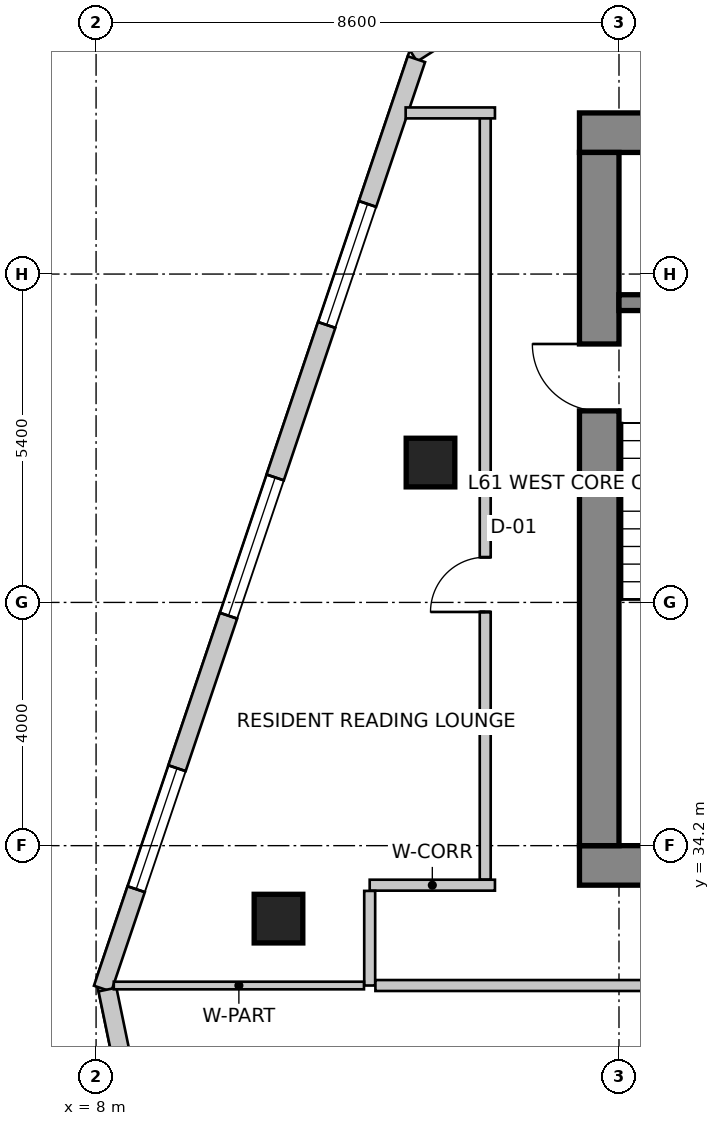
"""IFC4 building model, lengths in metres.
Left out: names, types, materials, properties, quantities, classifications, styles, units other than length and angle.
Written with IfcOpenShell. Run it as: python <this file> out.ifc"""

import sys

from ifc_helpers import new_model, si_unit, direction, frame, frame_2d, origin, origin_2d, place, context, subcontext, project, spatial, rectangle, extrude, source, transform, mapped, element, fill, save


model = new_model("IFC4")
c1 = context("Model", 3, precision=1e-05, world=origin(), true_north=direction((0.0, 1.0)))
c2 = subcontext(c1, "Body", "Model", "MODEL_VIEW")
j1 = project(units=[si_unit("LENGTHUNIT", "METRE"), si_unit("PLANEANGLEUNIT", "RADIAN")], contexts=[c1])
p1 = place(None, origin())
s1 = spatial("IfcSite", under=j1, at=p1, CompositionType="ELEMENT")
p2 = place(p1, origin())
s2 = spatial("IfcBuilding", under=s1, at=p2, CompositionType="ELEMENT")
p3 = place(p2, frame((0.0, 0.0, 239.4)))
s3 = spatial("IfcBuildingStorey", under=s2, at=p3, CompositionType="ELEMENT", Elevation=239.4)
p4 = place(p3, frame((15.95, 45.925, 0.0), z_axis=(0.0, 0.0, 1.0), x_axis=(1.0, 0.0, 0.0)))
e1 = element("IfcWall", 1, at=p4, inside=s3, PredefinedType="SHEAR", context=c2, shape_type="SweptSolid", body=[
    extrude(rectangle(XDim=15.7, YDim=0.65, at=frame_2d((7.85, 0.0))), origin(), (0.0, 0.0, 1.0), 3.5),
])
p5 = place(p3, frame((15.95, 33.875, 0.0), z_axis=(0.0, 0.0, 1.0), x_axis=(1.0, 0.0, 0.0)))
e2 = element("IfcWall", 2, at=p5, inside=s3, PredefinedType="SHEAR", context=c2, shape_type="SweptSolid", body=[
    extrude(rectangle(XDim=15.7, YDim=0.65, at=frame_2d((7.85, 0.0))), origin(), (0.0, 0.0, 1.0), 3.5),
])
m1 = source(origin(), c2, "Body", "SweptSolid", [
    extrude(rectangle(XDim=1.1, YDim=2.15, at=frame_2d((0.55, 1.075))), frame((0.0, 0.335, 0.0), z_axis=(0.0, -1.0, 0.0), x_axis=(1.0, 0.0, 0.0)), (0.0, 0.0, 1.0), 0.67),
])
p6 = place(p5, frame((10.08, 0.0, 0.0)))
e3 = element("IfcOpeningElement", 3, at=p6, cuts=e2, PredefinedType="OPENING", context=c2, shape_type="MappedRepresentation", body=[
    mapped(m1, transform((0.0, 0.0, 0.0), scale=1.0)),
])
p7 = place(p3, frame((16.275, 34.2, 0.0), z_axis=(0.0, 0.0, 1.0), x_axis=(0.0, 1.0, 0.0)))
e4 = element("IfcWall", 4, at=p7, inside=s3, PredefinedType="SHEAR", context=c2, shape_type="SweptSolid", body=[
    extrude(rectangle(XDim=11.4, YDim=0.65, at=frame_2d((5.7, 0.0))), origin(), (0.0, 0.0, 1.0), 3.5),
])
p8 = place(p7, frame((7.15, 0.0, 0.0)))
e5 = element("IfcOpeningElement", 5, at=p8, cuts=e4, PredefinedType="OPENING", context=c2, shape_type="MappedRepresentation", body=[
    mapped(m1, transform((0.0, 0.0, 0.0), scale=1.0)),
])
p9 = place(p3, frame((16.6, 43.13, 0.0), z_axis=(0.0, 0.0, 1.0), x_axis=(1.0, 0.0, 0.0)))
e6 = element("IfcWall", 6, at=p9, inside=s3, PredefinedType="SHEAR", context=c2, shape_type="SweptSolid", body=[
    extrude(rectangle(XDim=3.5, YDim=0.26, at=frame_2d((1.75, 0.0))), origin(), (0.0, 0.0, 1.0), 3.5),
])
m2 = source(origin(), c2, "Body", "SweptSolid", [
    extrude(rectangle(XDim=0.8, YDim=0.8, at=origin_2d()), origin(), (0.0, 0.0, 1.0), 3.5),
])
for number, where, z_axis, x_axis in (
    (7, (11.0, 33.0, 0.0), (0.0, 0.0, 1.0), (1.0, 0.0, 0.0)),
    (8, (13.5, 40.5, 0.0), (0.0, 0.0, 1.0), (1.0, 0.0, 0.0)),
):
    element("IfcColumn", number, at=place(p3, frame(where, z_axis=z_axis, x_axis=x_axis)), inside=s3, PredefinedType="COLUMN", context=c2, shape_type="MappedRepresentation", body=[
        mapped(m2, transform((0.0, 0.0, 0.0), scale=1.0)),
    ])
p10 = place(p3, frame((21.874, 52.742, 0.0), z_axis=(0.0, 0.0, 1.0), x_axis=(-0.84365659959, -0.536883173482, 0.0)))
e9 = element("IfcWall", 9, at=p10, inside=s3, PredefinedType="SOLIDWALL", context=c2, shape_type="SweptSolid", body=[
    extrude(rectangle(XDim=10.283, YDim=0.3, at=frame_2d((5.142, 0.0))), origin(), (0.0, 0.0, 1.0), 3.2),
])
m3 = source(origin(), c2, "Body", "SweptSolid", [
    extrude(rectangle(XDim=2.4, YDim=2.2, at=frame_2d((1.2, 1.1))), frame((0.0, 0.16, 0.0), z_axis=(0.0, -1.0, 0.0), x_axis=(1.0, 0.0, 0.0)), (0.0, 0.0, 1.0), 0.32),
])
p11 = place(p10, frame((3.307, 0.0, 0.85)))
e10 = element("IfcOpeningElement", 10, at=p11, cuts=e9, PredefinedType="OPENING", context=c2, shape_type="MappedRepresentation", body=[
    mapped(m3, transform((0.0, 0.0, 0.0), scale=1.0)),
])
p12 = place(p3, frame((13.269, 47.134, 0.0), z_axis=(0.0, 0.0, 1.0), x_axis=(-0.319920776449, -0.947444297464, 0.0)))
e11 = element("IfcWall", 11, at=p12, inside=s3, PredefinedType="SOLIDWALL", context=c2, shape_type="SweptSolid", body=[
    extrude(rectangle(XDim=16.133, YDim=0.3, at=frame_2d((8.067, 0.0))), origin(), (0.0, 0.0, 1.0), 3.2),
])
m4 = source(origin(), c2, "Body", "SweptSolid", [
    extrude(rectangle(XDim=2.1, YDim=2.0, at=frame_2d((1.05, 1.0))), frame((0.0, 0.16, 0.0), z_axis=(0.0, -1.0, 0.0), x_axis=(1.0, 0.0, 0.0)), (0.0, 0.0, 1.0), 0.32),
])
p13 = place(p12, frame((2.513, 0.0, 0.85)))
e12 = element("IfcOpeningElement", 12, at=p13, cuts=e11, PredefinedType="OPENING", context=c2, shape_type="MappedRepresentation", body=[
    mapped(m4, transform((0.0, 0.0, 0.0), scale=1.0)),
])
p14 = place(p12, frame((7.26, 0.0, 0.85)))
e13 = element("IfcOpeningElement", 13, at=p14, cuts=e11, PredefinedType="OPENING", context=c2, shape_type="MappedRepresentation", body=[
    mapped(m3, transform((0.0, 0.0, 0.0), scale=1.0)),
])
p15 = place(p12, frame((12.307, 0.0, 0.85)))
e14 = element("IfcOpeningElement", 14, at=p15, cuts=e11, PredefinedType="OPENING", context=c2, shape_type="MappedRepresentation", body=[
    mapped(m4, transform((0.0, 0.0, 0.0), scale=1.0)),
])
p16 = place(p3, frame((8.188, 31.834, 0.0), z_axis=(0.0, 0.0, 1.0), x_axis=(0.202303475707, -0.979322880217, 0.0)))
e15 = element("IfcWall", 15, at=p16, inside=s3, PredefinedType="SOLIDWALL", context=c2, shape_type="SweptSolid", body=[
    extrude(rectangle(XDim=15.766, YDim=0.3, at=frame_2d((7.883, 0.0))), origin(), (0.0, 0.0, 1.0), 3.2),
])
p17 = place(p16, frame((2.14, 0.0, 0.85)))
e16 = element("IfcOpeningElement", 16, at=p17, cuts=e15, PredefinedType="OPENING", context=c2, shape_type="MappedRepresentation", body=[
    mapped(m3, transform((0.0, 0.0, 0.0), scale=1.0)),
])
p18 = place(p16, frame((8.329, 0.0, 0.85)))
e17 = element("IfcOpeningElement", 17, at=p18, cuts=e15, PredefinedType="OPENING", context=c2, shape_type="MappedRepresentation", body=[
    mapped(m4, transform((0.0, 0.0, 0.0), scale=1.0)),
])
p19 = place(p16, frame((12.942, 0.0, 0.85)))
e18 = element("IfcOpeningElement", 18, at=p19, cuts=e15, PredefinedType="OPENING", context=c2, shape_type="MappedRepresentation", body=[
    mapped(m3, transform((0.0, 0.0, 0.0), scale=1.0)),
])
p20 = place(p3, frame((12.5, 33.55, 0.0), z_axis=(0.0, 0.0, 1.0), x_axis=(1.0, 0.0, 0.0)))
e19 = element("IfcWall", 19, at=p20, inside=s3, PredefinedType="PARTITIONING", context=c2, shape_type="SweptSolid", body=[
    extrude(rectangle(XDim=2.06, YDim=0.18, at=frame_2d((1.03, 0.0))), origin(), (0.0, 0.0, 1.0), 3.2),
])
p21 = place(p3, frame((12.5, 31.9, 0.0), z_axis=(0.0, 0.0, 1.0), x_axis=(0.0, 1.0, 0.0)))
e20 = element("IfcWall", 20, at=p21, inside=s3, PredefinedType="PARTITIONING", context=c2, shape_type="SweptSolid", body=[
    extrude(rectangle(XDim=1.556, YDim=0.18, at=frame_2d((0.778, 0.0))), origin(), (0.0, 0.0, 1.0), 2.869),
])
p22 = place(p3, frame((17.96, 31.9, 0.0), z_axis=(0.0, 0.0, 1.0), x_axis=(-1.0, 0.0, 0.0)))
e21 = element("IfcWall", 21, at=p22, inside=s3, PredefinedType="PARTITIONING", context=c2, shape_type="SweptSolid", body=[
    extrude(rectangle(XDim=5.366, YDim=0.18, at=frame_2d((2.683, 0.0))), origin(), (0.0, 0.0, 1.0), 2.869),
])
p23 = place(p3, frame((14.4, 33.644, 0.0), z_axis=(0.0, 0.0, 1.0), x_axis=(0.0, 1.0, 0.0)))
e22 = element("IfcWall", 22, at=p23, inside=s3, PredefinedType="PARTITIONING", context=c2, shape_type="SweptSolid", body=[
    extrude(rectangle(XDim=12.606, YDim=0.18, at=frame_2d((6.303, 0.0))), origin(), (0.0, 0.0, 1.0), 3.2),
])
m5 = source(origin(), c2, "Body", "SweptSolid", [
    extrude(rectangle(XDim=0.9, YDim=2.15, at=frame_2d((0.45, 1.075))), frame((0.0, 0.1, 0.0), z_axis=(0.0, -1.0, 0.0), x_axis=(1.0, 0.0, 0.0)), (0.0, 0.0, 1.0), 0.2),
])
p24 = place(p23, frame((4.399, 0.0, 0.0)))
e23 = element("IfcOpeningElement", 23, at=p24, cuts=e22, PredefinedType="OPENING", context=c2, shape_type="MappedRepresentation", body=[
    mapped(m5, transform((0.0, 0.0, 0.0), scale=1.0)),
])
p25 = place(p3, frame((14.56, 46.25, 0.0), z_axis=(0.0, 0.0, 1.0), x_axis=(-1.0, 0.0, 0.0)))
e24 = element("IfcWall", 24, at=p25, inside=s3, PredefinedType="PARTITIONING", context=c2, shape_type="SweptSolid", body=[
    extrude(rectangle(XDim=1.469, YDim=0.18, at=frame_2d((0.734, 0.0))), origin(), (0.0, 0.0, 1.0), 3.2),
])
p26 = place(p3, frame((12.406, 31.9, 0.0), z_axis=(0.0, 0.0, 1.0), x_axis=(-1.0, 0.0, 0.0)))
e25 = element("IfcWall", 25, at=p26, inside=s3, PredefinedType="PARTITIONING", context=c2, shape_type="SweptSolid", body=[
    extrude(rectangle(XDim=4.115, YDim=0.125, at=frame_2d((2.057, 0.0))), origin(), (0.0, 0.0, 1.0), 2.492),
])
m6 = source(origin(), c2, "Body", "SweptSolid", [
    extrude(rectangle(XDim=2.1, YDim=2.0, at=frame_2d((1.05, 1.0))), frame((0.0, -0.015, 0.0), z_axis=(0.0, -1.0, 0.0), x_axis=(1.0, 0.0, 0.0)), (0.0, 0.0, 1.0), 0.06),
])
p27 = place(p13, origin())
e26 = element("IfcWindow", 26, at=p27, inside=s3, PartitioningType="SINGLE_PANEL", PredefinedType="WINDOW", context=c2, shape_type="MappedRepresentation", body=[
    mapped(m6, transform((0.0, 0.0, 0.0), scale=1.0)),
])
fill(e12, e26)
m7 = source(origin(), c2, "Body", "SweptSolid", [
    extrude(rectangle(XDim=2.4, YDim=2.2, at=frame_2d((1.2, 1.1))), frame((0.0, -0.015, 0.0), z_axis=(0.0, -1.0, 0.0), x_axis=(1.0, 0.0, 0.0)), (0.0, 0.0, 1.0), 0.06),
])
p28 = place(p14, origin())
e27 = element("IfcWindow", 27, at=p28, inside=s3, PartitioningType="SINGLE_PANEL", PredefinedType="WINDOW", context=c2, shape_type="MappedRepresentation", body=[
    mapped(m7, transform((0.0, 0.0, 0.0), scale=1.0)),
])
fill(e13, e27)
p29 = place(p15, origin())
e28 = element("IfcWindow", 28, at=p29, inside=s3, PartitioningType="SINGLE_PANEL", PredefinedType="WINDOW", context=c2, shape_type="MappedRepresentation", body=[
    mapped(m6, transform((0.0, 0.0, 0.0), scale=1.0)),
])
fill(e14, e28)
m8 = source(origin(), c2, "Body", "SweptSolid", [
    extrude(rectangle(XDim=1.1, YDim=2.15, at=frame_2d((0.55, 1.075))), frame((0.0, 0.025, 0.0), z_axis=(0.0, -1.0, 0.0), x_axis=(1.0, 0.0, 0.0)), (0.0, 0.0, 1.0), 0.05),
])
p30 = place(p8, origin())
e29 = element("IfcDoor", 29, at=p30, inside=s3, OperationType="SINGLE_SWING_RIGHT", PredefinedType="DOOR", context=c2, shape_type="MappedRepresentation", body=[
    mapped(m8, transform((0.0, 0.0, 0.0), scale=1.0)),
])
fill(e5, e29)
m9 = source(origin(), c2, "Body", "SweptSolid", [
    extrude(rectangle(XDim=0.9, YDim=2.15, at=frame_2d((0.45, 1.075))), frame((0.0, 0.025, 0.0), z_axis=(0.0, -1.0, 0.0), x_axis=(1.0, 0.0, 0.0)), (0.0, 0.0, 1.0), 0.05),
])
p31 = place(p24, origin())
e30 = element("IfcDoor", 30, at=p31, inside=s3, OperationType="SINGLE_SWING_LEFT", PredefinedType="DOOR", context=c2, shape_type="MappedRepresentation", body=[
    mapped(m9, transform((0.0, 0.0, 0.0), scale=1.0)),
])
fill(e23, e30)
save(model, sys.argv[1])
